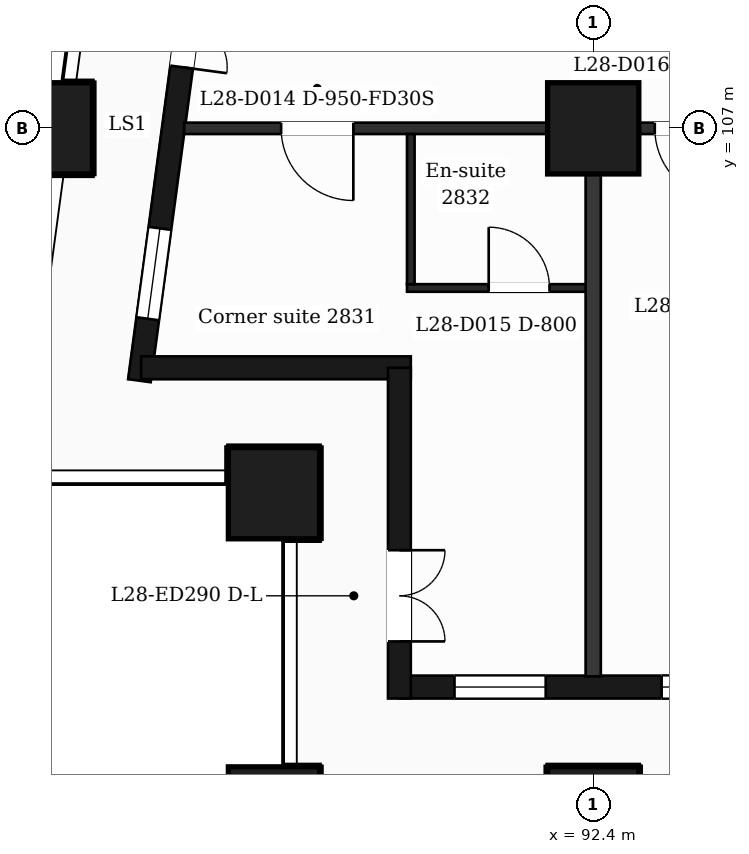
"""IFC4 building model, lengths in metres.
Left out: names, types, materials, properties, quantities, classifications, styles, units other than length and angle.
Written with IfcOpenShell. Run it as: python <this file> out.ifc"""

import sys

from ifc_helpers import new_model, si_unit, direction, frame, frame_2d, origin, origin_2d, place, context, subcontext, project, spatial, rectangle, extrude, element, fill, save


model = new_model("IFC4")
c1 = context("Model", 3, precision=1e-05, world=origin(), true_north=direction((0.0, 1.0)))
c2 = subcontext(c1, "Body", "Model", "MODEL_VIEW")
j1 = project(units=[si_unit("LENGTHUNIT", "METRE"), si_unit("PLANEANGLEUNIT", "RADIAN")], contexts=[c1])
p1 = place(None, origin())
s1 = spatial("IfcSite", under=j1, at=p1, CompositionType="ELEMENT")
p2 = place(p1, origin())
s2 = spatial("IfcBuilding", under=s1, at=p2, CompositionType="ELEMENT")
p3 = place(p2, frame((0.0, 0.0, 120.6)))
s3 = spatial("IfcBuildingStorey", under=s2, at=p3, CompositionType="ELEMENT", Elevation=120.6)
for number, where, z_axis, x_axis in (
    (1, (92.4, 98.0, 0.0), (0.0, 0.0, 1.0), (1.0, 0.0, 0.0)),
    (2, (88.2, 98.0, 0.0), (0.0, 0.0, 1.0), (1.0, 0.0, 0.0)),
    (3, (88.2, 102.2, 0.0), (0.0, 0.0, 1.0), (1.0, 0.0, 0.0)),
    (4, (92.4, 107.0, 0.0), (0.0, 0.0, 1.0), (1.0, 0.0, 0.0)),
    (5, (85.211, 107.0, 0.0), (0.0, 0.0, 1.0), (1.0, 0.0, 0.0)),
):
    element("IfcColumn", number, at=place(p3, frame(where, z_axis=z_axis, x_axis=x_axis)), inside=s3, PredefinedType="COLUMN", context=c2, shape_type="SweptSolid", body=[
        extrude(rectangle(XDim=1.2, YDim=1.2, at=origin_2d()), origin(), (0.0, 0.0, 1.0), 3.7),
    ])
p4 = place(p3, frame((89.85, 99.65, 0.0), z_axis=(0.0, 0.0, 1.0), x_axis=(1.0, 0.0, 0.0)))
e6 = element("IfcWall", 6, at=p4, inside=s3, PredefinedType="SOLIDWALL", context=c2, shape_type="SweptSolid", body=[
    extrude(rectangle(XDim=47.25, YDim=0.3, at=frame_2d((23.625, 0.0))), origin(), (0.0, 0.0, 1.0), 3.38),
])
p5 = place(p4, frame((0.725, 0.0, 0.9)))
e7 = element("IfcOpeningElement", 7, at=p5, cuts=e6, PredefinedType="OPENING", context=c2, shape_type="SweptSolid", body=[
    extrude(rectangle(XDim=1.2, YDim=2.1, at=frame_2d((0.6, 1.05))), frame((0.0, 0.16, 0.0), z_axis=(0.0, -1.0, 0.0), x_axis=(1.0, 0.0, 0.0)), (0.0, 0.0, 1.0), 0.32),
])
p6 = place(p4, frame((3.45, 0.0, 0.9)))
e8 = element("IfcOpeningElement", 8, at=p6, cuts=e6, PredefinedType="OPENING", context=c2, shape_type="SweptSolid", body=[
    extrude(rectangle(XDim=2.4, YDim=2.1, at=frame_2d((1.2, 1.05))), frame((0.0, 0.16, 0.0), z_axis=(0.0, -1.0, 0.0), x_axis=(1.0, 0.0, 0.0)), (0.0, 0.0, 1.0), 0.32),
])
p7 = place(p4, frame((7.65, 0.0, 0.9)))
e9 = element("IfcOpeningElement", 9, at=p7, cuts=e6, PredefinedType="OPENING", context=c2, shape_type="SweptSolid", body=[
    extrude(rectangle(XDim=2.4, YDim=2.1, at=frame_2d((1.2, 1.05))), frame((0.0, 0.16, 0.0), z_axis=(0.0, -1.0, 0.0), x_axis=(1.0, 0.0, 0.0)), (0.0, 0.0, 1.0), 0.32),
])
p8 = place(p4, frame((12.45, 0.0, 0.9)))
e10 = element("IfcOpeningElement", 10, at=p8, cuts=e6, PredefinedType="OPENING", context=c2, shape_type="SweptSolid", body=[
    extrude(rectangle(XDim=1.2, YDim=2.1, at=frame_2d((0.6, 1.05))), frame((0.0, 0.16, 0.0), z_axis=(0.0, -1.0, 0.0), x_axis=(1.0, 0.0, 0.0)), (0.0, 0.0, 1.0), 0.32),
])
p9 = place(p4, frame((16.65, 0.0, 0.9)))
e11 = element("IfcOpeningElement", 11, at=p9, cuts=e6, PredefinedType="OPENING", context=c2, shape_type="SweptSolid", body=[
    extrude(rectangle(XDim=1.2, YDim=2.1, at=frame_2d((0.6, 1.05))), frame((0.0, 0.16, 0.0), z_axis=(0.0, -1.0, 0.0), x_axis=(1.0, 0.0, 0.0)), (0.0, 0.0, 1.0), 0.32),
])
p10 = place(p4, frame((19.95, 0.0, 0.0)))
e12 = element("IfcOpeningElement", 12, at=p10, cuts=e6, PredefinedType="OPENING", context=c2, shape_type="SweptSolid", body=[
    extrude(rectangle(XDim=1.2, YDim=2.4, at=frame_2d((0.6, 1.2))), frame((0.0, 0.16, 0.0), z_axis=(0.0, -1.0, 0.0), x_axis=(1.0, 0.0, 0.0)), (0.0, 0.0, 1.0), 0.32),
])
p11 = place(p4, frame((21.75, 0.0, 0.9)))
e13 = element("IfcOpeningElement", 13, at=p11, cuts=e6, PredefinedType="OPENING", context=c2, shape_type="SweptSolid", body=[
    extrude(rectangle(XDim=1.2, YDim=2.1, at=frame_2d((0.6, 1.05))), frame((0.0, 0.16, 0.0), z_axis=(0.0, -1.0, 0.0), x_axis=(1.0, 0.0, 0.0)), (0.0, 0.0, 1.0), 0.32),
])
p12 = place(p4, frame((24.45, 0.0, 0.9)))
e14 = element("IfcOpeningElement", 14, at=p12, cuts=e6, PredefinedType="OPENING", context=c2, shape_type="SweptSolid", body=[
    extrude(rectangle(XDim=2.4, YDim=2.1, at=frame_2d((1.2, 1.05))), frame((0.0, 0.16, 0.0), z_axis=(0.0, -1.0, 0.0), x_axis=(1.0, 0.0, 0.0)), (0.0, 0.0, 1.0), 0.32),
])
p13 = place(p4, frame((28.35, 0.0, 0.0)))
e15 = element("IfcOpeningElement", 15, at=p13, cuts=e6, PredefinedType="OPENING", context=c2, shape_type="SweptSolid", body=[
    extrude(rectangle(XDim=1.2, YDim=2.4, at=frame_2d((0.6, 1.2))), frame((0.0, 0.16, 0.0), z_axis=(0.0, -1.0, 0.0), x_axis=(1.0, 0.0, 0.0)), (0.0, 0.0, 1.0), 0.32),
])
p14 = place(p4, frame((30.15, 0.0, 0.9)))
e16 = element("IfcOpeningElement", 16, at=p14, cuts=e6, PredefinedType="OPENING", context=c2, shape_type="SweptSolid", body=[
    extrude(rectangle(XDim=1.2, YDim=2.1, at=frame_2d((0.6, 1.05))), frame((0.0, 0.16, 0.0), z_axis=(0.0, -1.0, 0.0), x_axis=(1.0, 0.0, 0.0)), (0.0, 0.0, 1.0), 0.32),
])
p15 = place(p4, frame((32.85, 0.0, 0.9)))
e17 = element("IfcOpeningElement", 17, at=p15, cuts=e6, PredefinedType="OPENING", context=c2, shape_type="SweptSolid", body=[
    extrude(rectangle(XDim=2.4, YDim=2.1, at=frame_2d((1.2, 1.05))), frame((0.0, 0.16, 0.0), z_axis=(0.0, -1.0, 0.0), x_axis=(1.0, 0.0, 0.0)), (0.0, 0.0, 1.0), 0.32),
])
p16 = place(p4, frame((37.05, 0.0, 0.9)))
e18 = element("IfcOpeningElement", 18, at=p16, cuts=e6, PredefinedType="OPENING", context=c2, shape_type="SweptSolid", body=[
    extrude(rectangle(XDim=2.4, YDim=2.1, at=frame_2d((1.2, 1.05))), frame((0.0, 0.16, 0.0), z_axis=(0.0, -1.0, 0.0), x_axis=(1.0, 0.0, 0.0)), (0.0, 0.0, 1.0), 0.32),
])
p17 = place(p4, frame((41.85, 0.0, 0.9)))
e19 = element("IfcOpeningElement", 19, at=p17, cuts=e6, PredefinedType="OPENING", context=c2, shape_type="SweptSolid", body=[
    extrude(rectangle(XDim=1.2, YDim=2.1, at=frame_2d((0.6, 1.05))), frame((0.0, 0.16, 0.0), z_axis=(0.0, -1.0, 0.0), x_axis=(1.0, 0.0, 0.0)), (0.0, 0.0, 1.0), 0.32),
])
p18 = place(p4, frame((45.25, 0.0, 0.9)))
e20 = element("IfcOpeningElement", 20, at=p18, cuts=e6, PredefinedType="OPENING", context=c2, shape_type="SweptSolid", body=[
    extrude(rectangle(XDim=1.2, YDim=2.1, at=frame_2d((0.6, 1.05))), frame((0.0, 0.16, 0.0), z_axis=(0.0, -1.0, 0.0), x_axis=(1.0, 0.0, 0.0)), (0.0, 0.0, 1.0), 0.32),
])
p19 = place(p3, frame((87.334, 110.4, 0.0), z_axis=(0.0, 0.0, 1.0), x_axis=(-0.133437175554, -0.991057273915, 0.0)))
e21 = element("IfcWall", 21, at=p19, inside=s3, PredefinedType="SOLIDWALL", context=c2, shape_type="SweptSolid", body=[
    extrude(rectangle(XDim=6.781, YDim=0.3, at=frame_2d((3.39, 0.0))), origin(), (0.0, 0.0, 1.0), 3.38),
])
p20 = place(p19, frame((1.418, 0.0, 0.0)))
e22 = element("IfcOpeningElement", 22, at=p20, cuts=e21, PredefinedType="OPENING", context=c2, shape_type="SweptSolid", body=[
    extrude(rectangle(XDim=1.2, YDim=2.4, at=frame_2d((0.6, 1.2))), frame((0.0, 0.16, 0.0), z_axis=(0.0, -1.0, 0.0), x_axis=(1.0, 0.0, 0.0)), (0.0, 0.0, 1.0), 0.32),
])
p21 = place(p19, frame((4.758, 0.0, 0.9)))
e23 = element("IfcOpeningElement", 23, at=p21, cuts=e21, PredefinedType="OPENING", context=c2, shape_type="SweptSolid", body=[
    extrude(rectangle(XDim=1.2, YDim=2.1, at=frame_2d((0.6, 1.05))), frame((0.0, 0.16, 0.0), z_axis=(0.0, -1.0, 0.0), x_axis=(1.0, 0.0, 0.0)), (0.0, 0.0, 1.0), 0.32),
])
p22 = place(p3, frame((86.452, 103.85, 0.0), z_axis=(0.0, 0.0, 1.0), x_axis=(1.0, 0.0, 0.0)))
e24 = element("IfcWall", 24, at=p22, inside=s3, PredefinedType="SOLIDWALL", context=c2, shape_type="SweptSolid", body=[
    extrude(rectangle(XDim=3.548, YDim=0.3, at=frame_2d((1.774, 0.0))), origin(), (0.0, 0.0, 1.0), 3.38),
])
p23 = place(p3, frame((89.85, 103.85, 0.0), z_axis=(0.0, 0.0, 1.0), x_axis=(0.0, -1.0, 0.0)))
e25 = element("IfcWall", 25, at=p23, inside=s3, PredefinedType="SOLIDWALL", context=c2, shape_type="SweptSolid", body=[
    extrude(rectangle(XDim=4.35, YDim=0.3, at=frame_2d((2.175, 0.0))), origin(), (0.0, 0.0, 1.0), 3.38),
])
p24 = place(p23, frame((2.4, 0.0, 0.0)))
e26 = element("IfcOpeningElement", 26, at=p24, cuts=e25, PredefinedType="OPENING", context=c2, shape_type="SweptSolid", body=[
    extrude(rectangle(XDim=1.2, YDim=2.4, at=frame_2d((0.6, 1.2))), frame((0.0, 0.16, 0.0), z_axis=(0.0, -1.0, 0.0), x_axis=(1.0, 0.0, 0.0)), (0.0, 0.0, 1.0), 0.32),
])
p25 = place(p3, frame((89.95, 104.9, 0.0), z_axis=(0.0, 0.0, 1.0), x_axis=(1.0, 0.0, 0.0)))
e27 = element("IfcWall", 27, at=p25, inside=s3, PredefinedType="PARTITIONING", context=c2, shape_type="SweptSolid", body=[
    extrude(rectangle(XDim=2.45, YDim=0.1, at=frame_2d((1.225, 0.0))), origin(), (0.0, 0.0, 1.0), 3.38),
])
p26 = place(p25, frame((1.075, 0.0, 0.0)))
e28 = element("IfcOpeningElement", 28, at=p26, cuts=e27, PredefinedType="OPENING", context=c2, shape_type="SweptSolid", body=[
    extrude(rectangle(XDim=0.8, YDim=2.1, at=frame_2d((0.4, 1.05))), frame((0.0, 0.06, 0.0), z_axis=(0.0, -1.0, 0.0), x_axis=(1.0, 0.0, 0.0)), (0.0, 0.0, 1.0), 0.12),
])
p27 = place(p3, frame((87.018, 107.0, 0.0), z_axis=(0.0, 0.0, 1.0), x_axis=(1.0, 0.0, 0.0)))
e29 = element("IfcWall", 29, at=p27, inside=s3, PredefinedType="PARTITIONING", context=c2, shape_type="SweptSolid", body=[
    extrude(rectangle(XDim=52.765, YDim=0.15, at=frame_2d((26.382, 0.0))), origin(), (0.0, 0.0, 1.0), 3.38),
])
p28 = place(p27, frame((1.276, 0.0, 0.0)))
e30 = element("IfcOpeningElement", 30, at=p28, cuts=e29, PredefinedType="OPENING", context=c2, shape_type="SweptSolid", body=[
    extrude(rectangle(XDim=0.95, YDim=2.1, at=frame_2d((0.475, 1.05))), frame((0.0, 0.085, 0.0), z_axis=(0.0, -1.0, 0.0), x_axis=(1.0, 0.0, 0.0)), (0.0, 0.0, 1.0), 0.17),
])
p29 = place(p27, frame((6.192, 0.0, 0.0)))
e31 = element("IfcOpeningElement", 31, at=p29, cuts=e29, PredefinedType="OPENING", context=c2, shape_type="SweptSolid", body=[
    extrude(rectangle(XDim=0.95, YDim=2.1, at=frame_2d((0.475, 1.05))), frame((0.0, 0.085, 0.0), z_axis=(0.0, -1.0, 0.0), x_axis=(1.0, 0.0, 0.0)), (0.0, 0.0, 1.0), 0.17),
])
p30 = place(p27, frame((11.982, 0.0, 0.0)))
e32 = element("IfcOpeningElement", 32, at=p30, cuts=e29, PredefinedType="OPENING", context=c2, shape_type="SweptSolid", body=[
    extrude(rectangle(XDim=1.0, YDim=2.1, at=frame_2d((0.5, 1.05))), frame((0.0, 0.085, 0.0), z_axis=(0.0, -1.0, 0.0), x_axis=(1.0, 0.0, 0.0)), (0.0, 0.0, 1.0), 0.17),
])
p31 = place(p27, frame((14.582, 0.0, 0.0)))
e33 = element("IfcOpeningElement", 33, at=p31, cuts=e29, PredefinedType="OPENING", context=c2, shape_type="SweptSolid", body=[
    extrude(rectangle(XDim=0.95, YDim=2.1, at=frame_2d((0.475, 1.05))), frame((0.0, 0.085, 0.0), z_axis=(0.0, -1.0, 0.0), x_axis=(1.0, 0.0, 0.0)), (0.0, 0.0, 1.0), 0.17),
])
p32 = place(p27, frame((18.257, 0.0, 0.0)))
e34 = element("IfcOpeningElement", 34, at=p32, cuts=e29, PredefinedType="OPENING", context=c2, shape_type="SweptSolid", body=[
    extrude(rectangle(XDim=0.95, YDim=2.1, at=frame_2d((0.475, 1.05))), frame((0.0, 0.085, 0.0), z_axis=(0.0, -1.0, 0.0), x_axis=(1.0, 0.0, 0.0)), (0.0, 0.0, 1.0), 0.17),
])
p33 = place(p27, frame((22.992, 0.0, 0.0)))
e35 = element("IfcOpeningElement", 35, at=p33, cuts=e29, PredefinedType="OPENING", context=c2, shape_type="SweptSolid", body=[
    extrude(rectangle(XDim=0.95, YDim=2.1, at=frame_2d((0.475, 1.05))), frame((0.0, 0.085, 0.0), z_axis=(0.0, -1.0, 0.0), x_axis=(1.0, 0.0, 0.0)), (0.0, 0.0, 1.0), 0.17),
])
p34 = place(p27, frame((26.632, 0.0, 0.0)))
e36 = element("IfcOpeningElement", 36, at=p34, cuts=e29, PredefinedType="OPENING", context=c2, shape_type="SweptSolid", body=[
    extrude(rectangle(XDim=1.0, YDim=2.1, at=frame_2d((0.5, 1.05))), frame((0.0, 0.085, 0.0), z_axis=(0.0, -1.0, 0.0), x_axis=(1.0, 0.0, 0.0)), (0.0, 0.0, 1.0), 0.17),
])
p35 = place(p27, frame((33.557, 0.0, 0.0)))
e37 = element("IfcOpeningElement", 37, at=p35, cuts=e29, PredefinedType="OPENING", context=c2, shape_type="SweptSolid", body=[
    extrude(rectangle(XDim=0.95, YDim=2.1, at=frame_2d((0.475, 1.05))), frame((0.0, 0.085, 0.0), z_axis=(0.0, -1.0, 0.0), x_axis=(1.0, 0.0, 0.0)), (0.0, 0.0, 1.0), 0.17),
])
p36 = place(p27, frame((37.182, 0.0, 0.0)))
e38 = element("IfcOpeningElement", 38, at=p36, cuts=e29, PredefinedType="OPENING", context=c2, shape_type="SweptSolid", body=[
    extrude(rectangle(XDim=0.95, YDim=2.1, at=frame_2d((0.475, 1.05))), frame((0.0, 0.085, 0.0), z_axis=(0.0, -1.0, 0.0), x_axis=(1.0, 0.0, 0.0)), (0.0, 0.0, 1.0), 0.17),
])
p37 = place(p27, frame((41.957, 0.0, 0.0)))
e39 = element("IfcOpeningElement", 39, at=p37, cuts=e29, PredefinedType="OPENING", context=c2, shape_type="SweptSolid", body=[
    extrude(rectangle(XDim=0.95, YDim=2.1, at=frame_2d((0.475, 1.05))), frame((0.0, 0.085, 0.0), z_axis=(0.0, -1.0, 0.0), x_axis=(1.0, 0.0, 0.0)), (0.0, 0.0, 1.0), 0.17),
])
p38 = place(p27, frame((45.622, 0.0, 0.0)))
e40 = element("IfcOpeningElement", 40, at=p38, cuts=e29, PredefinedType="OPENING", context=c2, shape_type="SweptSolid", body=[
    extrude(rectangle(XDim=0.95, YDim=2.1, at=frame_2d((0.475, 1.05))), frame((0.0, 0.085, 0.0), z_axis=(0.0, -1.0, 0.0), x_axis=(1.0, 0.0, 0.0)), (0.0, 0.0, 1.0), 0.17),
])
p39 = place(p27, frame((48.56, 0.0, 0.0)))
e41 = element("IfcOpeningElement", 41, at=p39, cuts=e29, PredefinedType="OPENING", context=c2, shape_type="SweptSolid", body=[
    extrude(rectangle(XDim=0.95, YDim=2.1, at=frame_2d((0.475, 1.05))), frame((0.0, 0.085, 0.0), z_axis=(0.0, -1.0, 0.0), x_axis=(1.0, 0.0, 0.0)), (0.0, 0.0, 1.0), 0.17),
])
p40 = place(p3, frame((90.0, 104.95, 0.0), z_axis=(0.0, 0.0, 1.0), x_axis=(0.0, 1.0, 0.0)))
e42 = element("IfcWall", 42, at=p40, inside=s3, PredefinedType="PARTITIONING", context=c2, shape_type="SweptSolid", body=[
    extrude(rectangle(XDim=1.975, YDim=0.1, at=frame_2d((0.988, 0.0))), origin(), (0.0, 0.0, 1.0), 3.38),
])
p41 = place(p3, frame((92.4, 99.79, 0.0), z_axis=(0.0, 0.0, 1.0), x_axis=(0.0, 1.0, 0.0)))
e43 = element("IfcWall", 43, at=p41, inside=s3, PredefinedType="PARTITIONING", context=c2, shape_type="SweptSolid", body=[
    extrude(rectangle(XDim=7.135, YDim=0.2, at=frame_2d((3.567, 0.0))), origin(), (0.0, 0.0, 1.0), 3.38),
])
p42 = place(p5, origin())
e44 = element("IfcWindow", 44, at=p42, inside=s3, PartitioningType="SINGLE_PANEL", PredefinedType="WINDOW", context=c2, shape_type="SweptSolid", body=[
    extrude(rectangle(XDim=1.2, YDim=2.1, at=frame_2d((0.6, 1.05))), frame((0.0, 0.03, 0.0), z_axis=(0.0, -1.0, 0.0), x_axis=(1.0, 0.0, 0.0)), (0.0, 0.0, 1.0), 0.06),
])
fill(e7, e44)
p43 = place(p6, origin())
e45 = element("IfcWindow", 45, at=p43, inside=s3, PartitioningType="SINGLE_PANEL", PredefinedType="WINDOW", context=c2, shape_type="SweptSolid", body=[
    extrude(rectangle(XDim=2.4, YDim=2.1, at=frame_2d((1.2, 1.05))), frame((0.0, 0.03, 0.0), z_axis=(0.0, -1.0, 0.0), x_axis=(1.0, 0.0, 0.0)), (0.0, 0.0, 1.0), 0.06),
])
fill(e8, e45)
p44 = place(p20, origin())
e46 = element("IfcDoor", 46, at=p44, inside=s3, OperationType="DOUBLE_DOOR_SINGLE_SWING", PredefinedType="DOOR", context=c2, shape_type="SweptSolid", body=[
    extrude(rectangle(XDim=1.2, YDim=2.4, at=frame_2d((0.6, 1.2))), frame((0.0, 0.025, 0.0), z_axis=(0.0, -1.0, 0.0), x_axis=(1.0, 0.0, 0.0)), (0.0, 0.0, 1.0), 0.05),
])
fill(e22, e46)
p45 = place(p21, origin())
e47 = element("IfcWindow", 47, at=p45, inside=s3, PartitioningType="SINGLE_PANEL", PredefinedType="WINDOW", context=c2, shape_type="SweptSolid", body=[
    extrude(rectangle(XDim=1.2, YDim=2.1, at=frame_2d((0.6, 1.05))), frame((0.0, 0.03, 0.0), z_axis=(0.0, -1.0, 0.0), x_axis=(1.0, 0.0, 0.0)), (0.0, 0.0, 1.0), 0.06),
])
fill(e23, e47)
p46 = place(p24, origin())
e48 = element("IfcDoor", 48, at=p46, inside=s3, OperationType="DOUBLE_DOOR_SINGLE_SWING", PredefinedType="DOOR", context=c2, shape_type="SweptSolid", body=[
    extrude(rectangle(XDim=1.2, YDim=2.4, at=frame_2d((0.6, 1.2))), frame((0.0, 0.025, 0.0), z_axis=(0.0, -1.0, 0.0), x_axis=(1.0, 0.0, 0.0)), (0.0, 0.0, 1.0), 0.05),
])
fill(e26, e48)
p47 = place(p28, origin())
e49 = element("IfcDoor", 49, at=p47, inside=s3, OperationType="SINGLE_SWING_RIGHT", PredefinedType="DOOR", context=c2, shape_type="SweptSolid", body=[
    extrude(rectangle(XDim=0.95, YDim=2.1, at=frame_2d((0.475, 1.05))), frame((0.0, 0.025, 0.0), z_axis=(0.0, -1.0, 0.0), x_axis=(1.0, 0.0, 0.0)), (0.0, 0.0, 1.0), 0.05),
])
fill(e30, e49)
p48 = place(p26, origin())
e50 = element("IfcDoor", 50, at=p48, inside=s3, OperationType="SINGLE_SWING_LEFT", PredefinedType="DOOR", context=c2, shape_type="SweptSolid", body=[
    extrude(rectangle(XDim=0.8, YDim=2.1, at=frame_2d((0.4, 1.05))), frame((0.0, 0.025, 0.0), z_axis=(0.0, -1.0, 0.0), x_axis=(1.0, 0.0, 0.0)), (0.0, 0.0, 1.0), 0.05),
])
fill(e28, e50)
p49 = place(p29, origin())
e51 = element("IfcDoor", 51, at=p49, inside=s3, OperationType="SINGLE_SWING_RIGHT", PredefinedType="DOOR", context=c2, shape_type="SweptSolid", body=[
    extrude(rectangle(XDim=0.95, YDim=2.1, at=frame_2d((0.475, 1.05))), frame((0.0, 0.025, 0.0), z_axis=(0.0, -1.0, 0.0), x_axis=(1.0, 0.0, 0.0)), (0.0, 0.0, 1.0), 0.05),
])
fill(e31, e51)
save(model, sys.argv[1])
